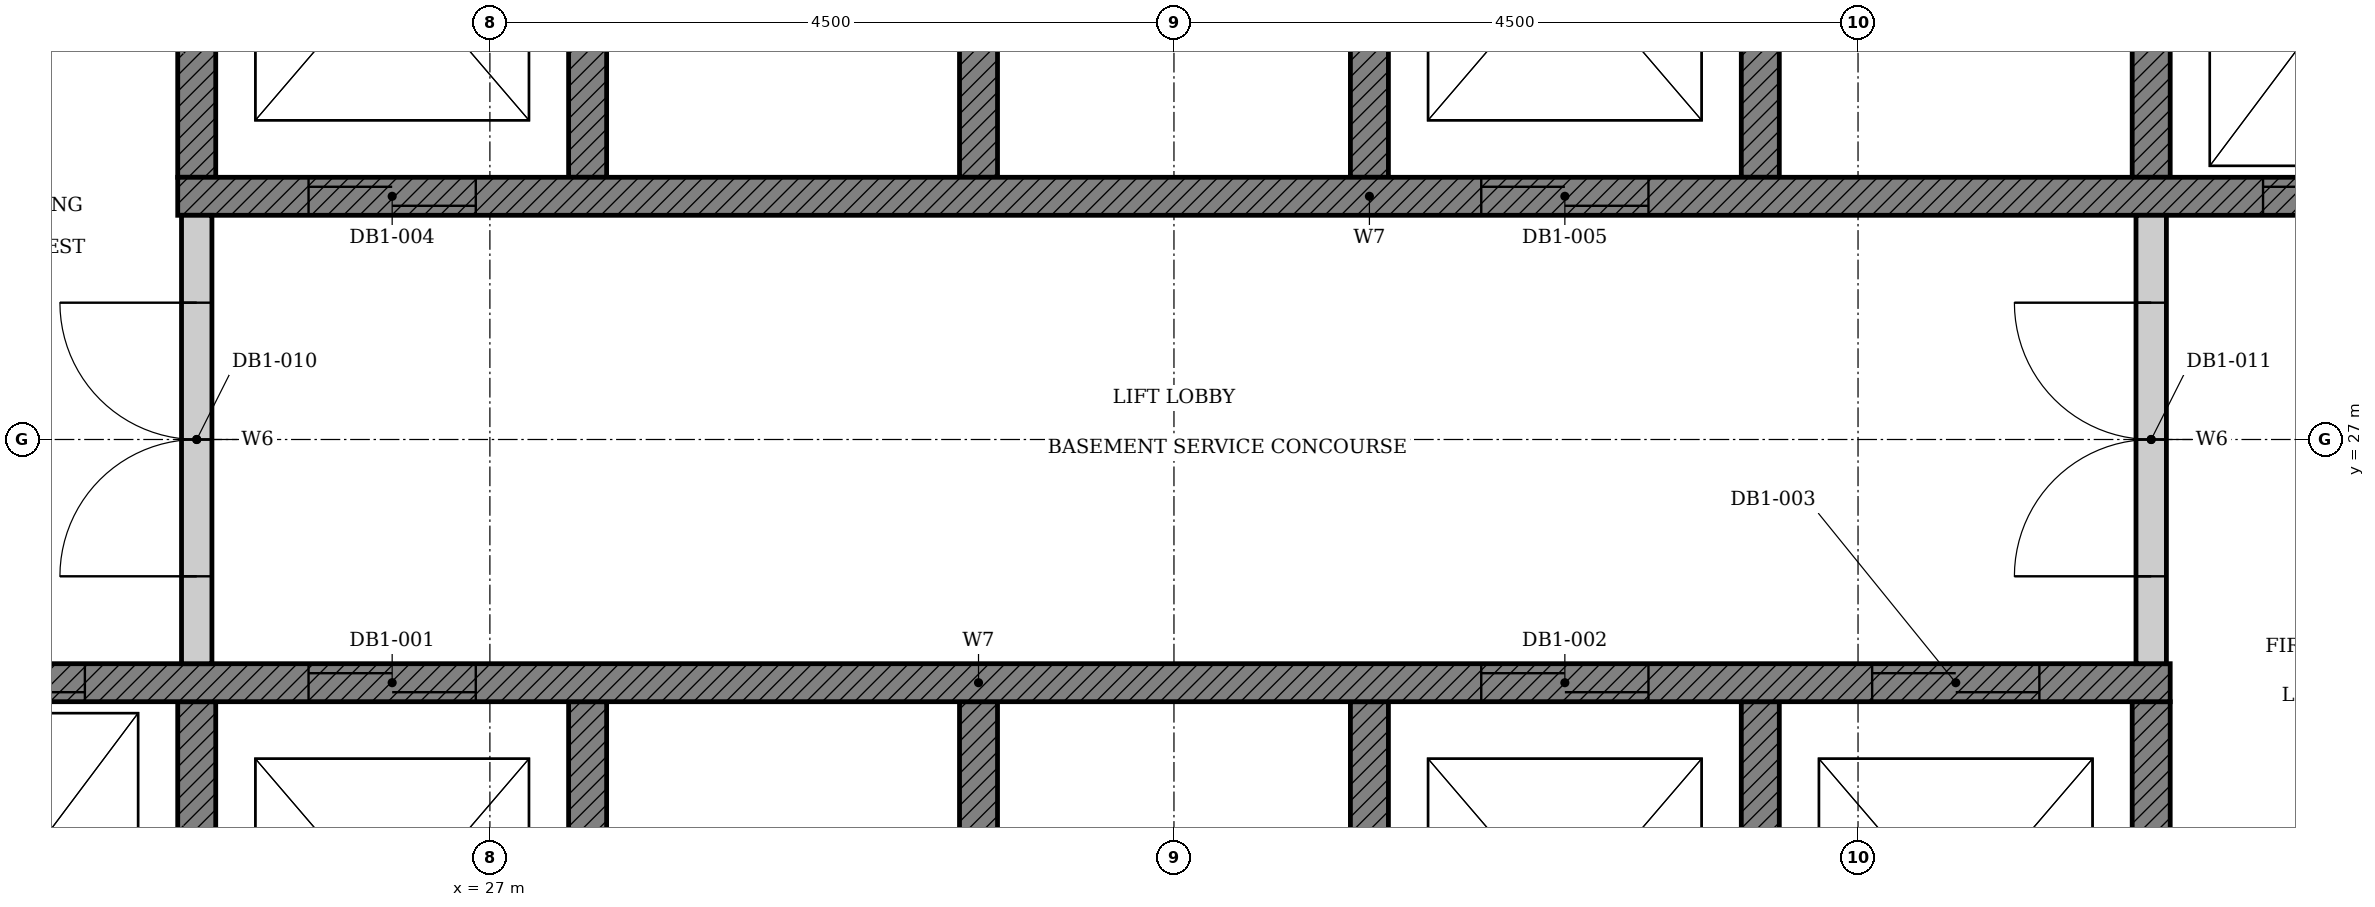
"""IFC4 building model, lengths in metres.
Left out: names, types, materials, properties, quantities, classifications, styles, units other than length and angle.
Written with IfcOpenShell. Run it as: python <this file> out.ifc"""

import sys

from ifc_helpers import new_model, si_unit, direction, frame, frame_2d, origin, place, context, subcontext, project, spatial, polyline, rectangle, outline, extrude, element, fill, save


model = new_model("IFC4")
c1 = context("Model", 3, precision=1e-05, world=origin(), true_north=direction((0.0, 1.0)))
c2 = subcontext(c1, "Body", "Model", "MODEL_VIEW")
j1 = project(units=[si_unit("LENGTHUNIT", "METRE"), si_unit("PLANEANGLEUNIT", "RADIAN")], contexts=[c1])
p1 = place(None, origin())
s1 = spatial("IfcSite", under=j1, at=p1, CompositionType="ELEMENT")
p2 = place(p1, origin())
s2 = spatial("IfcBuilding", under=s1, at=p2, CompositionType="ELEMENT")
p3 = place(p2, frame((0.0, 0.0, -6.0)))
s3 = spatial("IfcBuildingStorey", under=s2, at=p3, CompositionType="ELEMENT", Elevation=-6.0)
p4 = place(p3, origin())
e1 = element("IfcWall", 1, at=p4, inside=s3, PredefinedType="SHEAR", context=c2, shape_type="SweptSolid", body=[
    extrude(outline(polyline([(22.375, 22.35), (38.053, 22.35), (38.053, 25.275), (37.803, 25.275), (37.803, 22.65), (35.482, 22.65), (35.482, 25.275), (35.232, 25.275), (35.232, 22.65), (32.911, 22.65), (32.911, 25.275), (32.661, 25.275), (32.661, 22.65), (30.339, 22.65), (30.339, 25.275), (30.089, 25.275), (30.089, 22.65), (27.768, 22.65), (27.768, 25.275), (27.518, 25.275), (27.518, 22.65), (25.197, 22.65), (25.197, 25.275), (24.947, 25.275), (24.947, 22.65), (22.625, 22.65), (22.625, 25.275), (22.375, 25.275), (22.375, 22.35)])), origin(), (0.0, 0.0, 1.0), 5.6),
])
p5 = place(p3, origin())
e2 = element("IfcWall", 2, at=p5, inside=s3, PredefinedType="SHEAR", context=c2, shape_type="SweptSolid", body=[
    extrude(outline(polyline([(24.947, 28.725), (25.197, 28.725), (25.197, 31.35), (27.518, 31.35), (27.518, 28.725), (27.768, 28.725), (27.768, 31.35), (30.089, 31.35), (30.089, 28.725), (30.339, 28.725), (30.339, 31.35), (32.661, 31.35), (32.661, 28.725), (32.911, 28.725), (32.911, 31.35), (35.232, 31.35), (35.232, 28.725), (35.482, 28.725), (35.482, 31.35), (37.803, 31.35), (37.803, 28.725), (38.053, 28.725), (38.053, 31.35), (40.375, 31.35), (40.375, 28.725), (40.625, 28.725), (40.625, 31.65), (24.947, 31.65), (24.947, 28.725)])), origin(), (0.0, 0.0, 1.0), 5.6),
])
p6 = place(p3, frame((22.375, 25.4, 0.0), z_axis=(0.0, 0.0, 1.0), x_axis=(1.0, 0.0, 0.0)))
e3 = element("IfcWall", 3, at=p6, inside=s3, PredefinedType="SHEAR", context=c2, shape_type="SweptSolid", body=[
    extrude(rectangle(XDim=15.678, YDim=0.25, at=frame_2d((7.839, 0.0))), origin(), (0.0, 0.0, 1.0), 5.6),
])
p7 = place(p6, frame((3.432, 0.0, 0.0)))
e4 = element("IfcOpeningElement", 4, at=p7, cuts=e3, PredefinedType="OPENING", context=c2, shape_type="SweptSolid", body=[
    extrude(rectangle(XDim=1.1, YDim=2.1, at=frame_2d((0.55, 1.05))), frame((0.0, 0.135, 0.0), z_axis=(0.0, -1.0, 0.0), x_axis=(1.0, 0.0, 0.0)), (0.0, 0.0, 1.0), 0.27),
])
p8 = place(p6, frame((11.146, 0.0, 0.0)))
e5 = element("IfcOpeningElement", 5, at=p8, cuts=e3, PredefinedType="OPENING", context=c2, shape_type="SweptSolid", body=[
    extrude(rectangle(XDim=1.1, YDim=2.1, at=frame_2d((0.55, 1.05))), frame((0.0, 0.135, 0.0), z_axis=(0.0, -1.0, 0.0), x_axis=(1.0, 0.0, 0.0)), (0.0, 0.0, 1.0), 0.27),
])
p9 = place(p6, frame((13.718, 0.0, 0.0)))
e6 = element("IfcOpeningElement", 6, at=p9, cuts=e3, PredefinedType="OPENING", context=c2, shape_type="SweptSolid", body=[
    extrude(rectangle(XDim=1.1, YDim=2.1, at=frame_2d((0.55, 1.05))), frame((0.0, 0.135, 0.0), z_axis=(0.0, -1.0, 0.0), x_axis=(1.0, 0.0, 0.0)), (0.0, 0.0, 1.0), 0.27),
])
p10 = place(p6, frame((0.861, 0.0, 0.0)))
e7 = element("IfcOpeningElement", 7, at=p10, cuts=e3, PredefinedType="OPENING", context=c2, shape_type="SweptSolid", body=[
    extrude(rectangle(XDim=1.1, YDim=2.1, at=frame_2d((0.55, 1.05))), frame((0.0, 0.135, 0.0), z_axis=(0.0, -1.0, 0.0), x_axis=(1.0, 0.0, 0.0)), (0.0, 0.0, 1.0), 0.27),
])
p11 = place(p3, frame((24.947, 28.6, 0.0), z_axis=(0.0, 0.0, 1.0), x_axis=(1.0, 0.0, 0.0)))
e8 = element("IfcWall", 8, at=p11, inside=s3, PredefinedType="SHEAR", context=c2, shape_type="SweptSolid", body=[
    extrude(rectangle(XDim=15.678, YDim=0.25, at=frame_2d((7.839, 0.0))), origin(), (0.0, 0.0, 1.0), 5.6),
])
p12 = place(p11, frame((0.861, 0.0, 0.0)))
e9 = element("IfcOpeningElement", 9, at=p12, cuts=e8, PredefinedType="OPENING", context=c2, shape_type="SweptSolid", body=[
    extrude(rectangle(XDim=1.1, YDim=2.1, at=frame_2d((0.55, 1.05))), frame((0.0, 0.135, 0.0), z_axis=(0.0, -1.0, 0.0), x_axis=(1.0, 0.0, 0.0)), (0.0, 0.0, 1.0), 0.27),
])
p13 = place(p11, frame((8.575, 0.0, 0.0)))
e10 = element("IfcOpeningElement", 10, at=p13, cuts=e8, PredefinedType="OPENING", context=c2, shape_type="SweptSolid", body=[
    extrude(rectangle(XDim=1.1, YDim=2.1, at=frame_2d((0.55, 1.05))), frame((0.0, 0.135, 0.0), z_axis=(0.0, -1.0, 0.0), x_axis=(1.0, 0.0, 0.0)), (0.0, 0.0, 1.0), 0.27),
])
p14 = place(p11, frame((13.718, 0.0, 0.0)))
e11 = element("IfcOpeningElement", 11, at=p14, cuts=e8, PredefinedType="OPENING", context=c2, shape_type="SweptSolid", body=[
    extrude(rectangle(XDim=1.1, YDim=2.1, at=frame_2d((0.55, 1.05))), frame((0.0, 0.135, 0.0), z_axis=(0.0, -1.0, 0.0), x_axis=(1.0, 0.0, 0.0)), (0.0, 0.0, 1.0), 0.27),
])
p15 = place(p3, frame((25.072, 25.525, 0.0), z_axis=(0.0, 0.0, 1.0), x_axis=(0.0, 1.0, 0.0)))
e12 = element("IfcWall", 12, at=p15, inside=s3, PredefinedType="PARTITIONING", context=c2, shape_type="SweptSolid", body=[
    extrude(rectangle(XDim=2.95, YDim=0.2, at=frame_2d((1.475, 0.0))), origin(), (0.0, 0.0, 1.0), 5.6),
])
p16 = place(p15, frame((0.575, 0.0, 0.0)))
e13 = element("IfcOpeningElement", 13, at=p16, cuts=e12, PredefinedType="OPENING", context=c2, shape_type="SweptSolid", body=[
    extrude(rectangle(XDim=1.8, YDim=2.1, at=frame_2d((0.9, 1.05))), frame((0.0, 0.11, 0.0), z_axis=(0.0, -1.0, 0.0), x_axis=(1.0, 0.0, 0.0)), (0.0, 0.0, 1.0), 0.22),
])
p17 = place(p3, frame((37.928, 25.525, 0.0), z_axis=(0.0, 0.0, 1.0), x_axis=(0.0, 1.0, 0.0)))
e14 = element("IfcWall", 14, at=p17, inside=s3, PredefinedType="PARTITIONING", context=c2, shape_type="SweptSolid", body=[
    extrude(rectangle(XDim=2.95, YDim=0.2, at=frame_2d((1.475, 0.0))), origin(), (0.0, 0.0, 1.0), 5.6),
])
p18 = place(p17, frame((0.575, 0.0, 0.0)))
e15 = element("IfcOpeningElement", 15, at=p18, cuts=e14, PredefinedType="OPENING", context=c2, shape_type="SweptSolid", body=[
    extrude(rectangle(XDim=1.8, YDim=2.1, at=frame_2d((0.9, 1.05))), frame((0.0, 0.11, 0.0), z_axis=(0.0, -1.0, 0.0), x_axis=(1.0, 0.0, 0.0)), (0.0, 0.0, 1.0), 0.22),
])
p19 = place(p7, origin())
e16 = element("IfcDoor", 16, at=p19, inside=s3, OperationType="DOUBLE_DOOR_SLIDING", PredefinedType="DOOR", context=c2, shape_type="SweptSolid", body=[
    extrude(rectangle(XDim=1.1, YDim=2.1, at=frame_2d((0.55, 1.05))), frame((0.0, 0.025, 0.0), z_axis=(0.0, -1.0, 0.0), x_axis=(1.0, 0.0, 0.0)), (0.0, 0.0, 1.0), 0.05),
])
fill(e4, e16)
p20 = place(p8, origin())
e17 = element("IfcDoor", 17, at=p20, inside=s3, OperationType="DOUBLE_DOOR_SLIDING", PredefinedType="DOOR", context=c2, shape_type="SweptSolid", body=[
    extrude(rectangle(XDim=1.1, YDim=2.1, at=frame_2d((0.55, 1.05))), frame((0.0, 0.025, 0.0), z_axis=(0.0, -1.0, 0.0), x_axis=(1.0, 0.0, 0.0)), (0.0, 0.0, 1.0), 0.05),
])
fill(e5, e17)
p21 = place(p9, origin())
e18 = element("IfcDoor", 18, at=p21, inside=s3, OperationType="DOUBLE_DOOR_SLIDING", PredefinedType="DOOR", context=c2, shape_type="SweptSolid", body=[
    extrude(rectangle(XDim=1.1, YDim=2.1, at=frame_2d((0.55, 1.05))), frame((0.0, 0.025, 0.0), z_axis=(0.0, -1.0, 0.0), x_axis=(1.0, 0.0, 0.0)), (0.0, 0.0, 1.0), 0.05),
])
fill(e6, e18)
p22 = place(p12, origin())
e19 = element("IfcDoor", 19, at=p22, inside=s3, OperationType="DOUBLE_DOOR_SLIDING", PredefinedType="DOOR", context=c2, shape_type="SweptSolid", body=[
    extrude(rectangle(XDim=1.1, YDim=2.1, at=frame_2d((0.55, 1.05))), frame((0.0, 0.025, 0.0), z_axis=(0.0, -1.0, 0.0), x_axis=(1.0, 0.0, 0.0)), (0.0, 0.0, 1.0), 0.05),
])
fill(e9, e19)
p23 = place(p13, origin())
e20 = element("IfcDoor", 20, at=p23, inside=s3, OperationType="DOUBLE_DOOR_SLIDING", PredefinedType="DOOR", context=c2, shape_type="SweptSolid", body=[
    extrude(rectangle(XDim=1.1, YDim=2.1, at=frame_2d((0.55, 1.05))), frame((0.0, 0.025, 0.0), z_axis=(0.0, -1.0, 0.0), x_axis=(1.0, 0.0, 0.0)), (0.0, 0.0, 1.0), 0.05),
])
fill(e10, e20)
p24 = place(p10, origin())
e21 = element("IfcDoor", 21, at=p24, inside=s3, OperationType="DOUBLE_DOOR_SLIDING", PredefinedType="DOOR", context=c2, shape_type="SweptSolid", body=[
    extrude(rectangle(XDim=1.1, YDim=2.1, at=frame_2d((0.55, 1.05))), frame((0.0, 0.025, 0.0), z_axis=(0.0, -1.0, 0.0), x_axis=(1.0, 0.0, 0.0)), (0.0, 0.0, 1.0), 0.05),
])
fill(e7, e21)
p25 = place(p14, origin())
e22 = element("IfcDoor", 22, at=p25, inside=s3, OperationType="DOUBLE_DOOR_SLIDING", PredefinedType="DOOR", context=c2, shape_type="SweptSolid", body=[
    extrude(rectangle(XDim=1.1, YDim=2.1, at=frame_2d((0.55, 1.05))), frame((0.0, 0.025, 0.0), z_axis=(0.0, -1.0, 0.0), x_axis=(1.0, 0.0, 0.0)), (0.0, 0.0, 1.0), 0.05),
])
fill(e11, e22)
p26 = place(p16, origin())
e23 = element("IfcDoor", 23, at=p26, inside=s3, OperationType="DOUBLE_DOOR_SINGLE_SWING", PredefinedType="DOOR", context=c2, shape_type="SweptSolid", body=[
    extrude(rectangle(XDim=1.8, YDim=2.1, at=frame_2d((0.9, 1.05))), frame((0.0, 0.025, 0.0), z_axis=(0.0, -1.0, 0.0), x_axis=(1.0, 0.0, 0.0)), (0.0, 0.0, 1.0), 0.05),
])
fill(e13, e23)
p27 = place(p18, origin())
e24 = element("IfcDoor", 24, at=p27, inside=s3, OperationType="DOUBLE_DOOR_SINGLE_SWING", PredefinedType="DOOR", context=c2, shape_type="SweptSolid", body=[
    extrude(rectangle(XDim=1.8, YDim=2.1, at=frame_2d((0.9, 1.05))), frame((0.0, 0.025, 0.0), z_axis=(0.0, -1.0, 0.0), x_axis=(1.0, 0.0, 0.0)), (0.0, 0.0, 1.0), 0.05),
])
fill(e15, e24)
save(model, sys.argv[1])
